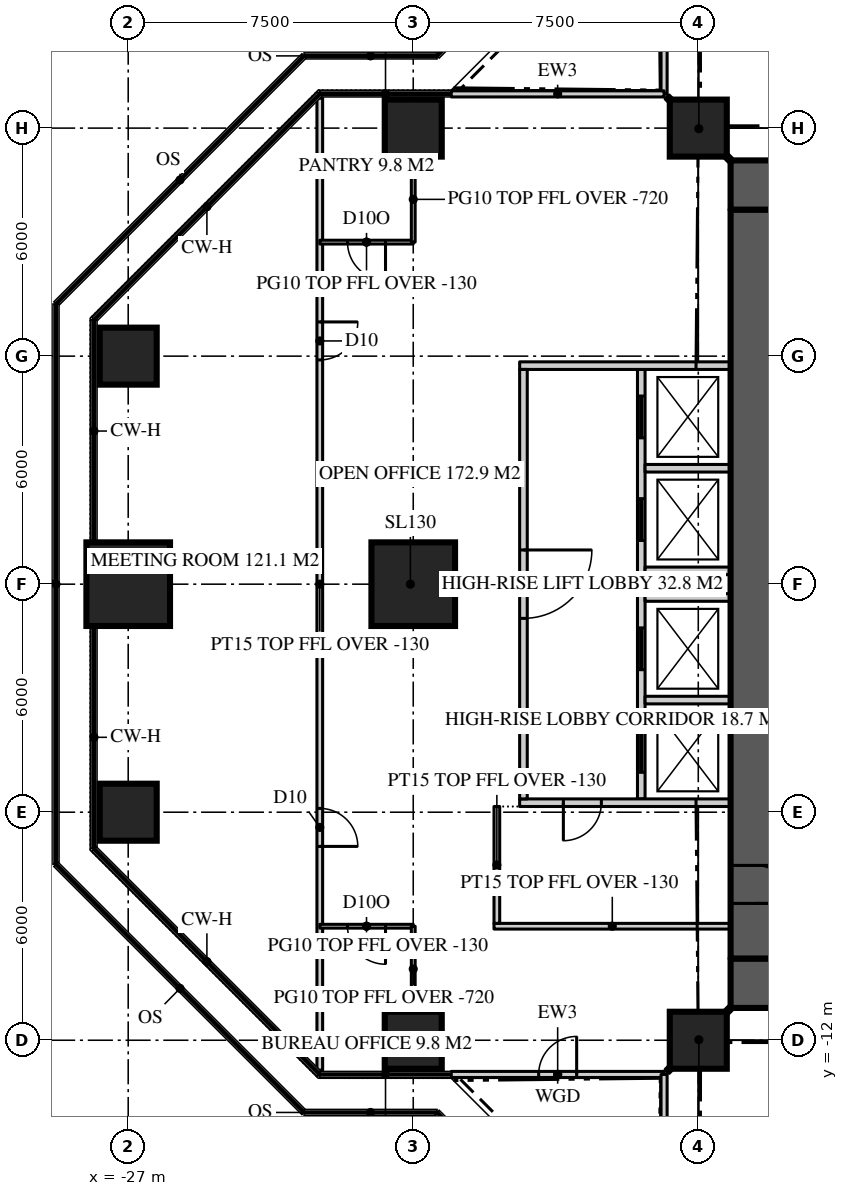
"""IFC4 building model, lengths in metres.
Left out: names, types, materials, properties, quantities, classifications, styles, units other than length and angle.
Written with IfcOpenShell. Run it as: python <this file> out.ifc"""

import sys

from ifc_helpers import new_model, si_unit, direction, frame, frame_2d, origin, origin_2d, place, context, subcontext, project, spatial, rectangle, extrude, element, fill, save


model = new_model("IFC4")
c1 = context("Model", 3, precision=1e-05, world=origin(), true_north=direction((0.0, 1.0)))
c2 = subcontext(c1, "Body", "Model", "MODEL_VIEW")
j1 = project(units=[si_unit("LENGTHUNIT", "METRE"), si_unit("PLANEANGLEUNIT", "RADIAN")], contexts=[c1])
p1 = place(None, origin())
s1 = spatial("IfcSite", under=j1, at=p1, CompositionType="ELEMENT")
p2 = place(p1, origin())
s2 = spatial("IfcBuilding", under=s1, at=p2, CompositionType="ELEMENT")
p3 = place(p2, frame((0.0, 0.0, 247.8)))
s3 = spatial("IfcBuildingStorey", under=s2, at=p3, CompositionType="ELEMENT", Elevation=247.8)
p4 = place(p3, frame((-11.15, 10.5, 0.0), z_axis=(0.0, 0.0, 1.0), x_axis=(1.0, 0.0, 0.0)))
e1 = element("IfcWall", 1, at=p4, inside=s3, PredefinedType="SHEAR", context=c2, shape_type="SweptSolid", body=[
    extrude(rectangle(XDim=22.3, YDim=1.3, at=frame_2d((11.15, 0.0))), origin(), (0.0, 0.0, 1.0), 3.9),
])
p5 = place(p4, frame((4.25, 0.0, 0.0)))
e2 = element("IfcOpeningElement", 2, at=p5, cuts=e1, PredefinedType="OPENING", context=c2, shape_type="SweptSolid", body=[
    extrude(rectangle(XDim=1.8, YDim=2.2, at=frame_2d((0.9, 1.1))), frame((0.0, 0.66, 0.0), z_axis=(0.0, -1.0, 0.0), x_axis=(1.0, 0.0, 0.0)), (0.0, 0.0, 1.0), 1.32),
])
p6 = place(p4, frame((16.25, 0.0, 0.0)))
e3 = element("IfcOpeningElement", 3, at=p6, cuts=e1, PredefinedType="OPENING", context=c2, shape_type="SweptSolid", body=[
    extrude(rectangle(XDim=1.8, YDim=2.2, at=frame_2d((0.9, 1.1))), frame((0.0, 0.66, 0.0), z_axis=(0.0, -1.0, 0.0), x_axis=(1.0, 0.0, 0.0)), (0.0, 0.0, 1.0), 1.32),
])
p7 = place(p3, frame((11.15, -10.5, 0.0), z_axis=(0.0, 0.0, 1.0), x_axis=(-1.0, 0.0, 0.0)))
e4 = element("IfcWall", 4, at=p7, inside=s3, PredefinedType="SHEAR", context=c2, shape_type="SweptSolid", body=[
    extrude(rectangle(XDim=22.3, YDim=1.3, at=frame_2d((11.15, 0.0))), origin(), (0.0, 0.0, 1.0), 3.9),
])
p8 = place(p7, frame((16.25, 0.0, 0.0)))
e5 = element("IfcOpeningElement", 5, at=p8, cuts=e4, PredefinedType="OPENING", context=c2, shape_type="SweptSolid", body=[
    extrude(rectangle(XDim=1.8, YDim=2.2, at=frame_2d((0.9, 1.1))), frame((0.0, 0.66, 0.0), z_axis=(0.0, -1.0, 0.0), x_axis=(1.0, 0.0, 0.0)), (0.0, 0.0, 1.0), 1.32),
])
p9 = place(p7, frame((4.25, 0.0, 0.0)))
e6 = element("IfcOpeningElement", 6, at=p9, cuts=e4, PredefinedType="OPENING", context=c2, shape_type="SweptSolid", body=[
    extrude(rectangle(XDim=1.8, YDim=2.2, at=frame_2d((0.9, 1.1))), frame((0.0, 0.66, 0.0), z_axis=(0.0, -1.0, 0.0), x_axis=(1.0, 0.0, 0.0)), (0.0, 0.0, 1.0), 1.32),
])
p10 = place(p3, frame((-10.5, 9.85, 0.0), z_axis=(0.0, 0.0, 1.0), x_axis=(0.0, -1.0, 0.0)))
e7 = element("IfcWall", 7, at=p10, inside=s3, PredefinedType="SHEAR", context=c2, shape_type="SweptSolid", body=[
    extrude(rectangle(XDim=19.7, YDim=1.3, at=frame_2d((9.85, 0.0))), origin(), (0.0, 0.0, 1.0), 3.9),
])
p11 = place(p10, frame((17.25, 0.0, 0.0)))
e8 = element("IfcOpeningElement", 8, at=p11, cuts=e7, PredefinedType="OPENING", context=c2, shape_type="SweptSolid", body=[
    extrude(rectangle(XDim=1.0, YDim=2.2, at=frame_2d((0.5, 1.1))), frame((0.0, 0.66, 0.0), z_axis=(0.0, -1.0, 0.0), x_axis=(1.0, 0.0, 0.0)), (0.0, 0.0, 1.0), 1.32),
])
for number, where, z_axis, x_axis in (
    (9, (-19.5, -12.0, 0.0), (0.0, 0.0, 1.0), (1.0, 0.0, 0.0)),
    (10, (-12.0, -12.0, 0.0), (0.0, 0.0, 1.0), (1.0, 0.0, 0.0)),
    (11, (-27.0, -6.0, 0.0), (0.0, 0.0, 1.0), (1.0, 0.0, 0.0)),
):
    element("IfcColumn", number, at=place(p3, frame(where, z_axis=z_axis, x_axis=x_axis)), inside=s3, PredefinedType="COLUMN", context=c2, shape_type="SweptSolid", body=[
        extrude(rectangle(XDim=1.5, YDim=1.5, at=origin_2d()), origin(), (0.0, 0.0, 1.0), 3.9),
    ])
for number, where, z_axis, x_axis in (
    (12, (-27.0, 0.0, 0.0), (0.0, 0.0, 1.0), (1.0, 0.0, 0.0)),
    (13, (-19.5, 0.0, 0.0), (0.0, 0.0, 1.0), (1.0, 0.0, 0.0)),
):
    element("IfcColumn", number, at=place(p3, frame(where, z_axis=z_axis, x_axis=x_axis)), inside=s3, PredefinedType="COLUMN", context=c2, shape_type="SweptSolid", body=[
        extrude(rectangle(XDim=2.2, YDim=2.2, at=origin_2d()), origin(), (0.0, 0.0, 1.0), 3.9),
    ])
for number, where, z_axis, x_axis in (
    (14, (-27.0, 6.0, 0.0), (0.0, 0.0, 1.0), (1.0, 0.0, 0.0)),
    (15, (-19.5, 12.0, 0.0), (0.0, 0.0, 1.0), (1.0, 0.0, 0.0)),
    (16, (-12.0, 12.0, 0.0), (0.0, 0.0, 1.0), (1.0, 0.0, 0.0)),
):
    element("IfcColumn", number, at=place(p3, frame(where, z_axis=z_axis, x_axis=x_axis)), inside=s3, PredefinedType="COLUMN", context=c2, shape_type="SweptSolid", body=[
        extrude(rectangle(XDim=1.5, YDim=1.5, at=origin_2d()), origin(), (0.0, 0.0, 1.0), 3.9),
    ])
p12 = place(p3, frame((-12.9, 18.5, 0.0), z_axis=(0.0, 0.0, 1.0), x_axis=(0.0, -1.0, 0.0)))
e17 = element("IfcWall", 17, at=p12, inside=s3, PredefinedType="SOLIDWALL", context=c2, shape_type="SweptSolid", body=[
    extrude(rectangle(XDim=5.6, YDim=0.16, at=frame_2d((2.8, 0.0))), origin(), (0.0, 0.0, 1.0), 3.77),
])
p13 = place(p12, frame((2.3, 0.0, 0.0)))
e18 = element("IfcOpeningElement", 18, at=p13, cuts=e17, PredefinedType="OPENING", context=c2, shape_type="SweptSolid", body=[
    extrude(rectangle(XDim=1.0, YDim=2.2, at=frame_2d((0.5, 1.1))), frame((0.0, 0.09, 0.0), z_axis=(0.0, -1.0, 0.0), x_axis=(1.0, 0.0, 0.0)), (0.0, 0.0, 1.0), 0.18),
])
p14 = place(p3, frame((-12.9, 12.9, 0.0), z_axis=(0.0, 0.0, 1.0), x_axis=(-1.0, 0.0, 0.0)))
e19 = element("IfcWall", 19, at=p14, inside=s3, PredefinedType="SOLIDWALL", context=c2, shape_type="SweptSolid", body=[
    extrude(rectangle(XDim=5.6, YDim=0.16, at=frame_2d((2.8, 0.0))), origin(), (0.0, 0.0, 1.0), 3.77),
])
p15 = place(p3, frame((-18.5, -12.9, 0.0), z_axis=(0.0, 0.0, 1.0), x_axis=(1.0, 0.0, 0.0)))
e20 = element("IfcWall", 20, at=p15, inside=s3, PredefinedType="SOLIDWALL", context=c2, shape_type="SweptSolid", body=[
    extrude(rectangle(XDim=5.6, YDim=0.16, at=frame_2d((2.8, 0.0))), origin(), (0.0, 0.0, 1.0), 3.77),
])
p16 = place(p15, frame((2.3, 0.0, 0.0)))
e21 = element("IfcOpeningElement", 21, at=p16, cuts=e20, PredefinedType="OPENING", context=c2, shape_type="SweptSolid", body=[
    extrude(rectangle(XDim=1.0, YDim=2.2, at=frame_2d((0.5, 1.1))), frame((0.0, 0.09, 0.0), z_axis=(0.0, -1.0, 0.0), x_axis=(1.0, 0.0, 0.0)), (0.0, 0.0, 1.0), 0.18),
])
p17 = place(p3, frame((-12.9, -12.9, 0.0), z_axis=(0.0, 0.0, 1.0), x_axis=(0.0, -1.0, 0.0)))
e22 = element("IfcWall", 22, at=p17, inside=s3, PredefinedType="SOLIDWALL", context=c2, shape_type="SweptSolid", body=[
    extrude(rectangle(XDim=5.6, YDim=0.16, at=frame_2d((2.8, 0.0))), origin(), (0.0, 0.0, 1.0), 3.77),
])
p18 = place(p3, frame((-21.959, 12.786, 0.0), z_axis=(0.0, 0.0, 1.0), x_axis=(0.0, -1.0, 0.0)))
e23 = element("IfcWall", 23, at=p18, inside=s3, PredefinedType="PARTITIONING", context=c2, shape_type="SweptSolid", body=[
    extrude(rectangle(XDim=25.573, YDim=0.15, at=frame_2d((12.786, 0.0))), origin(), (0.0, 0.0, 1.0), 3.77),
])
p19 = place(p18, frame((18.687, 0.0, 0.0)))
e24 = element("IfcOpeningElement", 24, at=p19, cuts=e23, PredefinedType="OPENING", context=c2, shape_type="SweptSolid", body=[
    extrude(rectangle(XDim=1.0, YDim=2.2, at=frame_2d((0.5, 1.1))), frame((0.0, 0.085, 0.0), z_axis=(0.0, -1.0, 0.0), x_axis=(1.0, 0.0, 0.0)), (0.0, 0.0, 1.0), 0.17),
])
p20 = place(p18, frame((5.886, 0.0, 0.0)))
e25 = element("IfcOpeningElement", 25, at=p20, cuts=e23, PredefinedType="OPENING", context=c2, shape_type="SweptSolid", body=[
    extrude(rectangle(XDim=1.0, YDim=2.2, at=frame_2d((0.5, 1.1))), frame((0.0, 0.085, 0.0), z_axis=(0.0, -1.0, 0.0), x_axis=(1.0, 0.0, 0.0)), (0.0, 0.0, 1.0), 0.17),
])
p21 = place(p3, frame((-19.5, -9.0, 0.0), z_axis=(0.0, 0.0, 1.0), x_axis=(-1.0, 0.0, 0.0)))
e26 = element("IfcWall", 26, at=p21, inside=s3, PredefinedType="PARTITIONING", context=c2, shape_type="SweptSolid", body=[
    extrude(rectangle(XDim=2.459, YDim=0.1, at=frame_2d((1.229, 0.0))), origin(), (0.0, 0.0, 1.0), 3.77),
])
p22 = place(p21, frame((0.729, 0.0, 0.0)))
e27 = element("IfcOpeningElement", 27, at=p22, cuts=e26, PredefinedType="OPENING", context=c2, shape_type="SweptSolid", body=[
    extrude(rectangle(XDim=1.0, YDim=2.2, at=frame_2d((0.5, 1.1))), frame((0.0, 0.06, 0.0), z_axis=(0.0, -1.0, 0.0), x_axis=(1.0, 0.0, 0.0)), (0.0, 0.0, 1.0), 0.12),
])
p23 = place(p3, frame((-19.5, -9.0, 0.0), z_axis=(0.0, 0.0, 1.0), x_axis=(0.0, -1.0, 0.0)))
e28 = element("IfcWall", 28, at=p23, inside=s3, PredefinedType="PARTITIONING", context=c2, shape_type="SweptSolid", body=[
    extrude(rectangle(XDim=2.25, YDim=0.1, at=frame_2d((1.125, 0.0))), origin(), (0.0, 0.0, 1.0), 3.18),
])
p24 = place(p3, frame((-19.5, 9.0, 0.0), z_axis=(0.0, 0.0, 1.0), x_axis=(-1.0, 0.0, 0.0)))
e29 = element("IfcWall", 29, at=p24, inside=s3, PredefinedType="PARTITIONING", context=c2, shape_type="SweptSolid", body=[
    extrude(rectangle(XDim=2.459, YDim=0.1, at=frame_2d((1.229, 0.0))), origin(), (0.0, 0.0, 1.0), 3.77),
])
p25 = place(p24, frame((0.729, 0.0, 0.0)))
e30 = element("IfcOpeningElement", 30, at=p25, cuts=e29, PredefinedType="OPENING", context=c2, shape_type="SweptSolid", body=[
    extrude(rectangle(XDim=1.0, YDim=2.2, at=frame_2d((0.5, 1.1))), frame((0.0, 0.06, 0.0), z_axis=(0.0, -1.0, 0.0), x_axis=(1.0, 0.0, 0.0)), (0.0, 0.0, 1.0), 0.12),
])
p26 = place(p3, frame((-19.5, 9.0, 0.0), z_axis=(0.0, 0.0, 1.0), x_axis=(0.0, 1.0, 0.0)))
e31 = element("IfcWall", 31, at=p26, inside=s3, PredefinedType="PARTITIONING", context=c2, shape_type="SweptSolid", body=[
    extrude(rectangle(XDim=2.25, YDim=0.1, at=frame_2d((1.125, 0.0))), origin(), (0.0, 0.0, 1.0), 3.18),
])
p27 = place(p3, frame((-13.5, 5.65, 0.0), z_axis=(0.0, 0.0, 1.0), x_axis=(0.0, -1.0, 0.0)))
e32 = element("IfcWall", 32, at=p27, inside=s3, PredefinedType="SOLIDWALL", context=c2, shape_type="SweptSolid", body=[
    extrude(rectangle(XDim=11.3, YDim=0.2, at=frame_2d((5.65, 0.0))), origin(), (0.0, 0.0, 1.0), 3.7),
])
p28 = place(p27, frame((0.7, 0.0, 0.0)))
e33 = element("IfcOpeningElement", 33, at=p28, cuts=e32, PredefinedType="OPENING", context=c2, shape_type="SweptSolid", body=[
    extrude(rectangle(XDim=1.1, YDim=2.2, at=frame_2d((0.55, 1.1))), frame((0.0, 0.11, 0.0), z_axis=(0.0, -1.0, 0.0), x_axis=(1.0, 0.0, 0.0)), (0.0, 0.0, 1.0), 0.22),
])
p29 = place(p27, frame((3.4, 0.0, 0.0)))
e34 = element("IfcOpeningElement", 34, at=p29, cuts=e32, PredefinedType="OPENING", context=c2, shape_type="SweptSolid", body=[
    extrude(rectangle(XDim=1.1, YDim=2.2, at=frame_2d((0.55, 1.1))), frame((0.0, 0.11, 0.0), z_axis=(0.0, -1.0, 0.0), x_axis=(1.0, 0.0, 0.0)), (0.0, 0.0, 1.0), 0.22),
])
p30 = place(p27, frame((6.8, 0.0, 0.0)))
e35 = element("IfcOpeningElement", 35, at=p30, cuts=e32, PredefinedType="OPENING", context=c2, shape_type="SweptSolid", body=[
    extrude(rectangle(XDim=1.1, YDim=2.2, at=frame_2d((0.55, 1.1))), frame((0.0, 0.11, 0.0), z_axis=(0.0, -1.0, 0.0), x_axis=(1.0, 0.0, 0.0)), (0.0, 0.0, 1.0), 0.22),
])
p31 = place(p27, frame((9.5, 0.0, 0.0)))
e36 = element("IfcOpeningElement", 36, at=p31, cuts=e32, PredefinedType="OPENING", context=c2, shape_type="SweptSolid", body=[
    extrude(rectangle(XDim=1.1, YDim=2.2, at=frame_2d((0.55, 1.1))), frame((0.0, 0.11, 0.0), z_axis=(0.0, -1.0, 0.0), x_axis=(1.0, 0.0, 0.0)), (0.0, 0.0, 1.0), 0.22),
])
p32 = place(p3, frame((-11.15, 5.75, 0.0), z_axis=(0.0, 0.0, 1.0), x_axis=(-1.0, 0.0, 0.0)))
e37 = element("IfcWall", 37, at=p32, inside=s3, PredefinedType="SOLIDWALL", context=c2, shape_type="SweptSolid", body=[
    extrude(rectangle(XDim=5.55, YDim=0.2, at=frame_2d((2.775, 0.0))), origin(), (0.0, 0.0, 1.0), 3.7),
])
p33 = place(p3, frame((-11.15, -5.75, 0.0), z_axis=(0.0, 0.0, 1.0), x_axis=(-1.0, 0.0, 0.0)))
e38 = element("IfcWall", 38, at=p33, inside=s3, PredefinedType="SOLIDWALL", context=c2, shape_type="SweptSolid", body=[
    extrude(rectangle(XDim=5.55, YDim=0.2, at=frame_2d((2.775, 0.0))), origin(), (0.0, 0.0, 1.0), 3.7),
])
p34 = place(p33, frame((3.4, 0.0, 0.0)))
e39 = element("IfcOpeningElement", 39, at=p34, cuts=e38, PredefinedType="OPENING", context=c2, shape_type="SweptSolid", body=[
    extrude(rectangle(XDim=1.0, YDim=2.2, at=frame_2d((0.5, 1.1))), frame((0.0, 0.11, 0.0), z_axis=(0.0, -1.0, 0.0), x_axis=(1.0, 0.0, 0.0)), (0.0, 0.0, 1.0), 0.22),
])
for number, where, z_axis, x_axis in (
    (40, (-11.15, 3.05, 0.0), (0.0, 0.0, 1.0), (-1.0, 0.0, 0.0)),
    (41, (-11.15, 0.35, 0.0), (0.0, 0.0, 1.0), (-1.0, 0.0, 0.0)),
    (42, (-11.15, -0.35, 0.0), (0.0, 0.0, 1.0), (-1.0, 0.0, 0.0)),
    (43, (-11.15, -3.05, 0.0), (0.0, 0.0, 1.0), (-1.0, 0.0, 0.0)),
):
    element("IfcWall", number, at=place(p3, frame(where, z_axis=z_axis, x_axis=x_axis)), inside=s3, PredefinedType="SOLIDWALL", context=c2, shape_type="SweptSolid", body=[
        extrude(rectangle(XDim=2.25, YDim=0.2, at=frame_2d((1.125, 0.0))), origin(), (0.0, 0.0, 1.0), 3.7),
    ])
p35 = place(p3, frame((-16.6, 5.65, 0.0), z_axis=(0.0, 0.0, 1.0), x_axis=(0.0, -1.0, 0.0)))
e44 = element("IfcWall", 44, at=p35, inside=s3, PredefinedType="SOLIDWALL", context=c2, shape_type="SweptSolid", body=[
    extrude(rectangle(XDim=11.3, YDim=0.2, at=frame_2d((5.65, 0.0))), origin(), (0.0, 0.0, 1.0), 3.18),
])
p36 = place(p35, frame((4.75, 0.0, 0.0)))
e45 = element("IfcOpeningElement", 45, at=p36, cuts=e44, PredefinedType="OPENING", context=c2, shape_type="SweptSolid", body=[
    extrude(rectangle(XDim=1.8, YDim=2.2, at=frame_2d((0.9, 1.1))), frame((0.0, 0.11, 0.0), z_axis=(0.0, -1.0, 0.0), x_axis=(1.0, 0.0, 0.0)), (0.0, 0.0, 1.0), 0.22),
])
for number, where, z_axis, x_axis in (
    (46, (-11.15, 11.15, 0.0), (0.0, 0.0, 1.0), (-0.707, 0.707, 0.0)),
    (47, (-11.15, -11.15, 0.0), (0.0, 0.0, 1.0), (-0.707, -0.707, 0.0)),
):
    element("IfcWall", number, at=place(p3, frame(where, z_axis=z_axis, x_axis=x_axis)), inside=s3, PredefinedType="PARTITIONING", context=c2, shape_type="SweptSolid", body=[
        extrude(rectangle(XDim=2.362, YDim=0.15, at=frame_2d((1.181, 0.0))), origin(), (0.0, 0.0, 1.0), 3.22),
    ])
p37 = place(p3, frame((-11.15, -9.0, 0.0), z_axis=(0.0, 0.0, 1.0), x_axis=(-1.0, 0.0, 0.0)))
e48 = element("IfcWall", 48, at=p37, inside=s3, PredefinedType="PARTITIONING", context=c2, shape_type="SweptSolid", body=[
    extrude(rectangle(XDim=6.225, YDim=0.15, at=frame_2d((3.113, 0.0))), origin(), (0.0, 0.0, 1.0), 3.77),
])
p38 = place(p3, frame((-17.3, -5.85, 0.0), z_axis=(0.0, 0.0, 1.0), x_axis=(0.0, -1.0, 0.0)))
e49 = element("IfcWall", 49, at=p38, inside=s3, PredefinedType="PARTITIONING", context=c2, shape_type="SweptSolid", body=[
    extrude(rectangle(XDim=3.075, YDim=0.15, at=frame_2d((1.538, 0.0))), origin(), (0.0, 0.0, 1.0), 3.77),
])
p39 = place(p16, origin())
e50 = element("IfcDoor", 50, at=p39, inside=s3, OperationType="SINGLE_SWING_RIGHT", PredefinedType="DOOR", context=c2, shape_type="SweptSolid", body=[
    extrude(rectangle(XDim=1.0, YDim=2.2, at=frame_2d((0.5, 1.1))), frame((0.0, 0.025, 0.0), z_axis=(0.0, -1.0, 0.0), x_axis=(1.0, 0.0, 0.0)), (0.0, 0.0, 1.0), 0.05),
])
fill(e21, e50)
p40 = place(p11, origin())
e51 = element("IfcDoor", 51, at=p40, inside=s3, OperationType="SINGLE_SWING_RIGHT", PredefinedType="DOOR", context=c2, shape_type="SweptSolid", body=[
    extrude(rectangle(XDim=1.0, YDim=2.2, at=frame_2d((0.5, 1.1))), frame((0.0, 0.025, 0.0), z_axis=(0.0, -1.0, 0.0), x_axis=(1.0, 0.0, 0.0)), (0.0, 0.0, 1.0), 0.05),
])
fill(e8, e51)
p41 = place(p19, origin())
e52 = element("IfcDoor", 52, at=p41, inside=s3, OperationType="SINGLE_SWING_RIGHT", PredefinedType="DOOR", context=c2, shape_type="SweptSolid", body=[
    extrude(rectangle(XDim=1.0, YDim=2.2, at=frame_2d((0.5, 1.1))), frame((0.0, 0.025, 0.0), z_axis=(0.0, -1.0, 0.0), x_axis=(1.0, 0.0, 0.0)), (0.0, 0.0, 1.0), 0.05),
])
fill(e24, e52)
p42 = place(p20, origin())
e53 = element("IfcDoor", 53, at=p42, inside=s3, OperationType="SINGLE_SWING_LEFT", PredefinedType="DOOR", context=c2, shape_type="SweptSolid", body=[
    extrude(rectangle(XDim=1.0, YDim=2.2, at=frame_2d((0.5, 1.1))), frame((0.0, 0.025, 0.0), z_axis=(0.0, -1.0, 0.0), x_axis=(1.0, 0.0, 0.0)), (0.0, 0.0, 1.0), 0.05),
])
fill(e25, e53)
p43 = place(p22, origin())
e54 = element("IfcDoor", 54, at=p43, inside=s3, OperationType="SINGLE_SWING_LEFT", PredefinedType="DOOR", context=c2, shape_type="SweptSolid", body=[
    extrude(rectangle(XDim=1.0, YDim=2.2, at=frame_2d((0.5, 1.1))), frame((0.0, 0.025, 0.0), z_axis=(0.0, -1.0, 0.0), x_axis=(1.0, 0.0, 0.0)), (0.0, 0.0, 1.0), 0.05),
])
fill(e27, e54)
p44 = place(p25, origin())
e55 = element("IfcDoor", 55, at=p44, inside=s3, OperationType="SINGLE_SWING_LEFT", PredefinedType="DOOR", context=c2, shape_type="SweptSolid", body=[
    extrude(rectangle(XDim=1.0, YDim=2.2, at=frame_2d((0.5, 1.1))), frame((0.0, 0.025, 0.0), z_axis=(0.0, -1.0, 0.0), x_axis=(1.0, 0.0, 0.0)), (0.0, 0.0, 1.0), 0.05),
])
fill(e30, e55)
p45 = place(p36, origin())
e56 = element("IfcDoor", 56, at=p45, inside=s3, OperationType="DOUBLE_DOOR_DOUBLE_SWING", PredefinedType="DOOR", context=c2, shape_type="SweptSolid", body=[
    extrude(rectangle(XDim=1.8, YDim=2.2, at=frame_2d((0.9, 1.1))), frame((0.0, 0.025, 0.0), z_axis=(0.0, -1.0, 0.0), x_axis=(1.0, 0.0, 0.0)), (0.0, 0.0, 1.0), 0.05),
])
fill(e45, e56)
p46 = place(p28, origin())
e57 = element("IfcDoor", 57, at=p46, inside=s3, OperationType="SLIDING_TO_LEFT", PredefinedType="DOOR", context=c2, shape_type="SweptSolid", body=[
    extrude(rectangle(XDim=1.1, YDim=2.2, at=frame_2d((0.55, 1.1))), frame((0.0, 0.025, 0.0), z_axis=(0.0, -1.0, 0.0), x_axis=(1.0, 0.0, 0.0)), (0.0, 0.0, 1.0), 0.05),
])
fill(e33, e57)
p47 = place(p29, origin())
e58 = element("IfcDoor", 58, at=p47, inside=s3, OperationType="SLIDING_TO_LEFT", PredefinedType="DOOR", context=c2, shape_type="SweptSolid", body=[
    extrude(rectangle(XDim=1.1, YDim=2.2, at=frame_2d((0.55, 1.1))), frame((0.0, 0.025, 0.0), z_axis=(0.0, -1.0, 0.0), x_axis=(1.0, 0.0, 0.0)), (0.0, 0.0, 1.0), 0.05),
])
fill(e34, e58)
p48 = place(p30, origin())
e59 = element("IfcDoor", 59, at=p48, inside=s3, OperationType="SLIDING_TO_LEFT", PredefinedType="DOOR", context=c2, shape_type="SweptSolid", body=[
    extrude(rectangle(XDim=1.1, YDim=2.2, at=frame_2d((0.55, 1.1))), frame((0.0, 0.025, 0.0), z_axis=(0.0, -1.0, 0.0), x_axis=(1.0, 0.0, 0.0)), (0.0, 0.0, 1.0), 0.05),
])
fill(e35, e59)
p49 = place(p31, origin())
e60 = element("IfcDoor", 60, at=p49, inside=s3, OperationType="SLIDING_TO_LEFT", PredefinedType="DOOR", context=c2, shape_type="SweptSolid", body=[
    extrude(rectangle(XDim=1.1, YDim=2.2, at=frame_2d((0.55, 1.1))), frame((0.0, 0.025, 0.0), z_axis=(0.0, -1.0, 0.0), x_axis=(1.0, 0.0, 0.0)), (0.0, 0.0, 1.0), 0.05),
])
fill(e36, e60)
p50 = place(p34, origin())
e61 = element("IfcDoor", 61, at=p50, inside=s3, OperationType="SINGLE_SWING_RIGHT", PredefinedType="DOOR", context=c2, shape_type="SweptSolid", body=[
    extrude(rectangle(XDim=1.0, YDim=2.2, at=frame_2d((0.5, 1.1))), frame((0.0, 0.025, 0.0), z_axis=(0.0, -1.0, 0.0), x_axis=(1.0, 0.0, 0.0)), (0.0, 0.0, 1.0), 0.05),
])
fill(e39, e61)
save(model, sys.argv[1])
